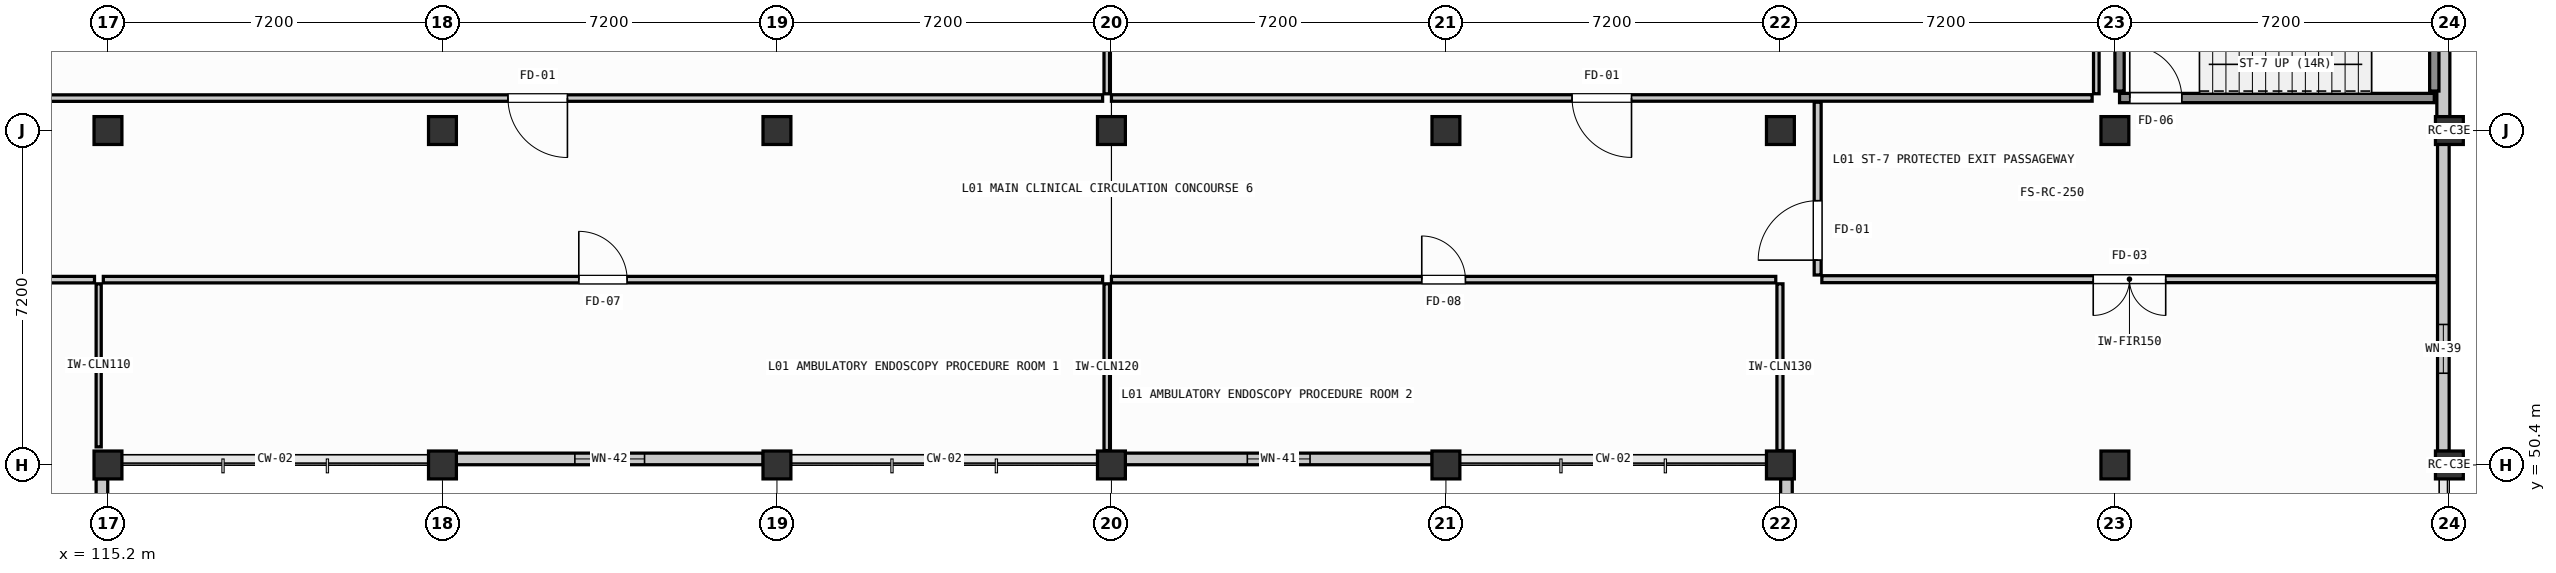
"""IFC4 building model, lengths in metres.
Left out: names, types, materials, properties, quantities, classifications, styles, units other than length and angle.
Written with IfcOpenShell. Run it as: python <this file> out.ifc"""

import sys

from ifc_helpers import new_model, si_unit, direction, frame, frame_2d, origin, origin_2d, place, context, subcontext, project, spatial, rectangle, extrude, element, fill, save


model = new_model("IFC4")
c1 = context("Model", 3, precision=1e-05, world=origin(), true_north=direction((0.0, 1.0)))
c2 = subcontext(c1, "Body", "Model", "MODEL_VIEW")
j1 = project(units=[si_unit("LENGTHUNIT", "METRE"), si_unit("PLANEANGLEUNIT", "RADIAN")], contexts=[c1])
p1 = place(None, origin())
s1 = spatial("IfcSite", under=j1, at=p1, CompositionType="ELEMENT")
p2 = place(p1, origin())
s2 = spatial("IfcBuilding", under=s1, at=p2, CompositionType="ELEMENT")
p3 = place(p2, origin())
s3 = spatial("IfcBuildingStorey", under=s2, at=p3, CompositionType="ELEMENT", Elevation=0.0)
for number, where, z_axis, x_axis in (
    (1, (115.2, 50.4, -0.25), (0.0, 0.0, 1.0), (1.0, 0.0, 0.0)),
    (2, (115.2, 57.6, -0.25), (0.0, 0.0, 1.0), (1.0, 0.0, 0.0)),
    (3, (122.4, 50.4, -0.25), (0.0, 0.0, 1.0), (1.0, 0.0, 0.0)),
    (4, (122.4, 57.6, -0.25), (0.0, 0.0, 1.0), (1.0, 0.0, 0.0)),
    (5, (129.6, 50.4, -0.25), (0.0, 0.0, 1.0), (1.0, 0.0, 0.0)),
    (6, (129.6, 57.6, -0.25), (0.0, 0.0, 1.0), (1.0, 0.0, 0.0)),
    (7, (136.8, 50.4, -0.25), (0.0, 0.0, 1.0), (1.0, 0.0, 0.0)),
    (8, (136.8, 57.6, -0.25), (0.0, 0.0, 1.0), (1.0, 0.0, 0.0)),
    (9, (144.0, 50.4, -0.25), (0.0, 0.0, 1.0), (1.0, 0.0, 0.0)),
    (10, (144.0, 57.6, -0.25), (0.0, 0.0, 1.0), (1.0, 0.0, 0.0)),
    (11, (151.2, 50.4, -0.25), (0.0, 0.0, 1.0), (1.0, 0.0, 0.0)),
    (12, (151.2, 57.6, -0.25), (0.0, 0.0, 1.0), (1.0, 0.0, 0.0)),
    (13, (158.4, 50.4, -0.25), (0.0, 0.0, 1.0), (1.0, 0.0, 0.0)),
    (14, (158.4, 57.6, -0.25), (0.0, 0.0, 1.0), (1.0, 0.0, 0.0)),
    (15, (165.6, 50.4, -0.25), (0.0, 0.0, 1.0), (1.0, 0.0, 0.0)),
    (16, (165.6, 57.6, -0.25), (0.0, 0.0, 1.0), (1.0, 0.0, 0.0)),
):
    element("IfcColumn", number, at=place(p3, frame(where, z_axis=z_axis, x_axis=x_axis)), inside=s3, PredefinedType="COLUMN", context=c2, shape_type="SweptSolid", body=[
        extrude(rectangle(XDim=0.6, YDim=0.6, at=origin_2d()), origin(), (0.0, 0.0, 1.0), 4.81),
    ])
p4 = place(p3, frame((165.47, 64.505, 0.0), z_axis=(0.0, 0.0, 1.0), x_axis=(0.0, -1.0, 0.0)))
e17 = element("IfcWall", 17, at=p4, inside=s3, PredefinedType="SOLIDWALL", context=c2, shape_type="SweptSolid", body=[
    extrude(rectangle(XDim=6.61, YDim=0.28, at=frame_2d((3.305, 0.0))), origin(), (0.0, 0.0, 1.0), 3.76),
])
p5 = place(p3, frame((165.47, 57.305, 0.0), z_axis=(0.0, 0.0, 1.0), x_axis=(0.0, -1.0, 0.0)))
e18 = element("IfcWall", 18, at=p5, inside=s3, PredefinedType="SOLIDWALL", context=c2, shape_type="SweptSolid", body=[
    extrude(rectangle(XDim=6.61, YDim=0.25, at=frame_2d((3.305, 0.0))), origin(), (0.0, 0.0, 1.0), 3.76),
])
p6 = place(p5, frame((3.88, 0.0, 0.95)))
e19 = element("IfcOpeningElement", 19, at=p6, cuts=e18, PredefinedType="OPENING", context=c2, shape_type="SweptSolid", body=[
    extrude(rectangle(XDim=1.05, YDim=1.55, at=frame_2d((0.525, 0.775))), frame((0.0, 0.135, 0.0), z_axis=(0.0, -1.0, 0.0), x_axis=(1.0, 0.0, 0.0)), (0.0, 0.0, 1.0), 0.27),
])
p7 = place(p3, frame((151.33, 43.495, 0.0), z_axis=(0.0, 0.0, 1.0), x_axis=(0.0, 1.0, 0.0)))
e20 = element("IfcWall", 20, at=p7, inside=s3, PredefinedType="SOLIDWALL", context=c2, shape_type="SweptSolid", body=[
    extrude(rectangle(XDim=6.61, YDim=0.25, at=frame_2d((3.305, 0.0))), origin(), (0.0, 0.0, 1.0), 3.76),
])
p8 = place(p7, frame((2.105, 0.0, 0.0)))
e21 = element("IfcOpeningElement", 21, at=p8, cuts=e20, PredefinedType="OPENING", context=c2, shape_type="SweptSolid", body=[
    extrude(rectangle(XDim=2.4, YDim=2.5, at=frame_2d((1.2, 1.25))), frame((0.0, 0.135, 0.0), z_axis=(0.0, -1.0, 0.0), x_axis=(1.0, 0.0, 0.0)), (0.0, 0.0, 1.0), 0.27),
])
p9 = place(p3, frame((143.705, 50.53, 0.0), z_axis=(0.0, 0.0, 1.0), x_axis=(-1.0, 0.0, 0.0)))
e22 = element("IfcWall", 22, at=p9, inside=s3, PredefinedType="SOLIDWALL", context=c2, shape_type="SweptSolid", body=[
    extrude(rectangle(XDim=6.61, YDim=0.25, at=frame_2d((3.305, 0.0))), origin(), (0.0, 0.0, 1.0), 3.76),
])
p10 = place(p9, frame((2.63, 0.0, 0.95)))
e23 = element("IfcOpeningElement", 23, at=p10, cuts=e22, PredefinedType="OPENING", context=c2, shape_type="SweptSolid", body=[
    extrude(rectangle(XDim=1.35, YDim=1.55, at=frame_2d((0.675, 0.775))), frame((0.0, 0.135, 0.0), z_axis=(0.0, -1.0, 0.0), x_axis=(1.0, 0.0, 0.0)), (0.0, 0.0, 1.0), 0.27),
])
p11 = place(p3, frame((129.305, 50.53, 0.0), z_axis=(0.0, 0.0, 1.0), x_axis=(-1.0, 0.0, 0.0)))
e24 = element("IfcWall", 24, at=p11, inside=s3, PredefinedType="SOLIDWALL", context=c2, shape_type="SweptSolid", body=[
    extrude(rectangle(XDim=6.61, YDim=0.25, at=frame_2d((3.305, 0.0))), origin(), (0.0, 0.0, 1.0), 3.76),
])
p12 = place(p11, frame((2.555, 0.0, 0.95)))
e25 = element("IfcOpeningElement", 25, at=p12, cuts=e24, PredefinedType="OPENING", context=c2, shape_type="SweptSolid", body=[
    extrude(rectangle(XDim=1.5, YDim=1.55, at=frame_2d((0.75, 0.775))), frame((0.0, 0.135, 0.0), z_axis=(0.0, -1.0, 0.0), x_axis=(1.0, 0.0, 0.0)), (0.0, 0.0, 1.0), 0.27),
])
p13 = place(p3, frame((115.07, 50.105, 0.0), z_axis=(0.0, 0.0, 1.0), x_axis=(0.0, -1.0, 0.0)))
e26 = element("IfcWall", 26, at=p13, inside=s3, PredefinedType="SOLIDWALL", context=c2, shape_type="SweptSolid", body=[
    extrude(rectangle(XDim=6.61, YDim=0.25, at=frame_2d((3.305, 0.0))), origin(), (0.0, 0.0, 1.0), 3.76),
])
p14 = place(p13, frame((2.48, 0.0, 0.95)))
e27 = element("IfcOpeningElement", 27, at=p14, cuts=e26, PredefinedType="OPENING", context=c2, shape_type="SweptSolid", body=[
    extrude(rectangle(XDim=1.65, YDim=1.55, at=frame_2d((0.825, 0.775))), frame((0.0, 0.135, 0.0), z_axis=(0.0, -1.0, 0.0), x_axis=(1.0, 0.0, 0.0)), (0.0, 0.0, 1.0), 0.27),
])
p15 = place(p3, frame((158.5, 58.3, -0.25), z_axis=(0.0, 0.0, 1.0), x_axis=(1.0, 0.0, 0.0)))
e28 = element("IfcWall", 28, at=p15, inside=s3, PredefinedType="SHEAR", context=c2, shape_type="SweptSolid", body=[
    extrude(rectangle(XDim=6.775, YDim=0.2, at=frame_2d((3.387, 0.0))), origin(), (0.0, 0.0, 1.0), 5.05),
])
p16 = place(p15, frame((0.22, 0.0, 0.25)))
e29 = element("IfcOpeningElement", 29, at=p16, cuts=e28, PredefinedType="OPENING", context=c2, shape_type="SweptSolid", body=[
    extrude(rectangle(XDim=1.12, YDim=2.14, at=frame_2d((0.56, 1.07))), frame((0.0, 0.11, 0.0), z_axis=(0.0, -1.0, 0.0), x_axis=(1.0, 0.0, 0.0)), (0.0, 0.0, 1.0), 0.22),
])
for number, where, z_axis, x_axis in (
    (30, (158.5, 58.45, -0.25), (0.0, 0.0, 1.0), (0.0, 1.0, 0.0)),
    (31, (165.275, 58.45, -0.25), (0.0, 0.0, 1.0), (0.0, 1.0, 0.0)),
):
    element("IfcWall", number, at=place(p3, frame(where, z_axis=z_axis, x_axis=x_axis)), inside=s3, PredefinedType="SHEAR", context=c2, shape_type="SweptSolid", body=[
        extrude(rectangle(XDim=2.6, YDim=0.2, at=frame_2d((1.3, 0.0))), origin(), (0.0, 0.0, 1.0), 5.05),
    ])
p17 = place(p3, frame((165.335, 54.4, 0.0), z_axis=(0.0, 0.0, 1.0), x_axis=(-1.0, 0.0, 0.0)))
e32 = element("IfcWall", 32, at=p17, inside=s3, PredefinedType="PARTITIONING", context=c2, shape_type="SweptSolid", body=[
    extrude(rectangle(XDim=13.243, YDim=0.15, at=frame_2d((6.622, 0.0))), origin(), (0.0, 0.0, 1.0), 3.86),
])
p18 = place(p17, frame((5.842, 0.0, 0.0)))
e33 = element("IfcOpeningElement", 33, at=p18, cuts=e32, PredefinedType="OPENING", context=c2, shape_type="SweptSolid", body=[
    extrude(rectangle(XDim=1.56, YDim=2.22, at=frame_2d((0.78, 1.11))), frame((0.0, 0.085, 0.0), z_axis=(0.0, -1.0, 0.0), x_axis=(1.0, 0.0, 0.0)), (0.0, 0.0, 1.0), 0.17),
])
p19 = place(p3, frame((152.002, 54.49, 0.0), z_axis=(0.0, 0.0, 1.0), x_axis=(0.0, 1.0, 0.0)))
e34 = element("IfcWall", 34, at=p19, inside=s3, PredefinedType="PARTITIONING", context=c2, shape_type="SweptSolid", body=[
    extrude(rectangle(XDim=3.72, YDim=0.15, at=frame_2d((1.86, 0.0))), origin(), (0.0, 0.0, 1.0), 3.76),
])
p20 = place(p19, frame((0.32, 0.0, 0.0)))
e35 = element("IfcOpeningElement", 35, at=p20, cuts=e34, PredefinedType="OPENING", context=c2, shape_type="SweptSolid", body=[
    extrude(rectangle(XDim=1.28, YDim=2.18, at=frame_2d((0.64, 1.09))), frame((0.0, 0.085, 0.0), z_axis=(0.0, -1.0, 0.0), x_axis=(1.0, 0.0, 0.0)), (0.0, 0.0, 1.0), 0.17),
])
p21 = place(p3, frame((101.29, 54.39, 0.0), z_axis=(0.0, 0.0, 1.0), x_axis=(1.0, 0.0, 0.0)))
e36 = element("IfcWall", 36, at=p21, inside=s3, PredefinedType="PARTITIONING", context=c2, shape_type="SweptSolid", body=[
    extrude(rectangle(XDim=13.62, YDim=0.14, at=frame_2d((6.81, 0.0))), origin(), (0.0, 0.0, 1.0), 3.86),
])
p22 = place(p21, frame((6.25, 0.0, 0.0)))
e37 = element("IfcOpeningElement", 37, at=p22, cuts=e36, PredefinedType="OPENING", context=c2, shape_type="SweptSolid", body=[
    extrude(rectangle(XDim=1.12, YDim=2.14, at=frame_2d((0.56, 1.07))), frame((0.0, 0.08, 0.0), z_axis=(0.0, -1.0, 0.0), x_axis=(1.0, 0.0, 0.0)), (0.0, 0.0, 1.0), 0.16),
])
p23 = place(p3, frame((115.0, 54.3, 0.0), z_axis=(0.0, 0.0, 1.0), x_axis=(0.0, -1.0, 0.0)))
e38 = element("IfcWall", 38, at=p23, inside=s3, PredefinedType="PARTITIONING", context=c2, shape_type="SweptSolid", body=[
    extrude(rectangle(XDim=3.511, YDim=0.11, at=frame_2d((1.755, 0.0))), origin(), (0.0, 0.0, 1.0), 3.76),
])
p24 = place(p3, frame((115.1, 54.39, 0.0), z_axis=(0.0, 0.0, 1.0), x_axis=(1.0, 0.0, 0.0)))
e39 = element("IfcWall", 39, at=p24, inside=s3, PredefinedType="PARTITIONING", context=c2, shape_type="SweptSolid", body=[
    extrude(rectangle(XDim=21.51, YDim=0.14, at=frame_2d((10.755, 0.0))), origin(), (0.0, 0.0, 1.0), 3.86),
])
p25 = place(p24, frame((10.235, 0.0, 0.0)))
e40 = element("IfcOpeningElement", 40, at=p25, cuts=e39, PredefinedType="OPENING", context=c2, shape_type="SweptSolid", body=[
    extrude(rectangle(XDim=1.04, YDim=2.12, at=frame_2d((0.52, 1.06))), frame((0.0, 0.08, 0.0), z_axis=(0.0, -1.0, 0.0), x_axis=(1.0, 0.0, 0.0)), (0.0, 0.0, 1.0), 0.16),
])
p26 = place(p3, frame((136.7, 54.3, 0.0), z_axis=(0.0, 0.0, 1.0), x_axis=(0.0, -1.0, 0.0)))
e41 = element("IfcWall", 41, at=p26, inside=s3, PredefinedType="PARTITIONING", context=c2, shape_type="SweptSolid", body=[
    extrude(rectangle(XDim=3.59, YDim=0.12, at=frame_2d((1.795, 0.0))), origin(), (0.0, 0.0, 1.0), 3.76),
])
p27 = place(p3, frame((136.8, 54.39, 0.0), z_axis=(0.0, 0.0, 1.0), x_axis=(1.0, 0.0, 0.0)))
e42 = element("IfcWall", 42, at=p27, inside=s3, PredefinedType="PARTITIONING", context=c2, shape_type="SweptSolid", body=[
    extrude(rectangle(XDim=14.3, YDim=0.14, at=frame_2d((7.15, 0.0))), origin(), (0.0, 0.0, 1.0), 3.86),
])
p28 = place(p27, frame((6.68, 0.0, 0.0)))
e43 = element("IfcOpeningElement", 43, at=p28, cuts=e42, PredefinedType="OPENING", context=c2, shape_type="SweptSolid", body=[
    extrude(rectangle(XDim=0.94, YDim=2.1, at=frame_2d((0.47, 1.05))), frame((0.0, 0.08, 0.0), z_axis=(0.0, -1.0, 0.0), x_axis=(1.0, 0.0, 0.0)), (0.0, 0.0, 1.0), 0.16),
])
p29 = place(p3, frame((151.19, 54.3, 0.0), z_axis=(0.0, 0.0, 1.0), x_axis=(0.0, -1.0, 0.0)))
e44 = element("IfcWall", 44, at=p29, inside=s3, PredefinedType="PARTITIONING", context=c2, shape_type="SweptSolid", body=[
    extrude(rectangle(XDim=3.59, YDim=0.13, at=frame_2d((1.795, 0.0))), origin(), (0.0, 0.0, 1.0), 3.76),
])
p30 = place(p3, frame((136.7, 64.49, 0.0), z_axis=(0.0, 0.0, 1.0), x_axis=(0.0, -1.0, 0.0)))
e45 = element("IfcWall", 45, at=p30, inside=s3, PredefinedType="PARTITIONING", context=c2, shape_type="SweptSolid", body=[
    extrude(rectangle(XDim=6.1, YDim=0.12, at=frame_2d((3.05, 0.0))), origin(), (0.0, 0.0, 1.0), 3.76),
])
p31 = place(p30, frame((2.35, 0.0, 1.15)))
e46 = element("IfcOpeningElement", 46, at=p31, cuts=e45, PredefinedType="OPENING", context=c2, shape_type="SweptSolid", body=[
    extrude(rectangle(XDim=1.4, YDim=1.05, at=frame_2d((0.7, 0.525))), frame((0.0, 0.07, 0.0), z_axis=(0.0, -1.0, 0.0), x_axis=(1.0, 0.0, 0.0)), (0.0, 0.0, 1.0), 0.14),
])
p32 = place(p3, frame((136.61, 58.301, 0.0), z_axis=(0.0, 0.0, 1.0), x_axis=(-0.999999994495, -0.000104930876, 0.0)))
e47 = element("IfcWall", 47, at=p32, inside=s3, PredefinedType="PARTITIONING", context=c2, shape_type="SweptSolid", body=[
    extrude(rectangle(XDim=27.92, YDim=0.14, at=frame_2d((13.96, 0.0))), origin(), (0.0, 0.0, 1.0), 3.86),
])
p33 = place(p32, frame((11.52, 0.0, 0.0)))
e48 = element("IfcOpeningElement", 48, at=p33, cuts=e47, PredefinedType="OPENING", context=c2, shape_type="SweptSolid", body=[
    extrude(rectangle(XDim=1.28, YDim=2.18, at=frame_2d((0.64, 1.09))), frame((0.0, 0.08, 0.0), z_axis=(0.0, -1.0, 0.0), x_axis=(1.0, 0.0, 0.0)), (0.0, 0.0, 1.0), 0.16),
])
p34 = place(p3, frame((158.0, 64.51, 0.0), z_axis=(0.0, 0.0, 1.0), x_axis=(0.0, -1.0, 0.0)))
e49 = element("IfcWall", 49, at=p34, inside=s3, PredefinedType="PARTITIONING", context=c2, shape_type="SweptSolid", body=[
    extrude(rectangle(XDim=6.118, YDim=0.12, at=frame_2d((3.059, 0.0))), origin(), (0.0, 0.0, 1.0), 3.76),
])
p35 = place(p3, frame((157.91, 58.302, 0.0), z_axis=(0.0, 0.0, 1.0), x_axis=(-0.999999997592, -6.9391437e-05, 0.0)))
e50 = element("IfcWall", 50, at=p35, inside=s3, PredefinedType="PARTITIONING", context=c2, shape_type="SweptSolid", body=[
    extrude(rectangle(XDim=21.11, YDim=0.14, at=frame_2d((10.555, 0.0))), origin(), (0.0, 0.0, 1.0), 3.86),
])
p36 = place(p35, frame((9.915, 0.0, 0.0)))
e51 = element("IfcOpeningElement", 51, at=p36, cuts=e50, PredefinedType="OPENING", context=c2, shape_type="SweptSolid", body=[
    extrude(rectangle(XDim=1.28, YDim=2.18, at=frame_2d((0.64, 1.09))), frame((0.0, 0.08, 0.0), z_axis=(0.0, -1.0, 0.0), x_axis=(1.0, 0.0, 0.0)), (0.0, 0.0, 1.0), 0.16),
])
p37 = place(p6, origin())
e52 = element("IfcWindow", 52, at=p37, inside=s3, PartitioningType="SINGLE_PANEL", PredefinedType="WINDOW", context=c2, shape_type="SweptSolid", body=[
    extrude(rectangle(XDim=1.05, YDim=1.55, at=frame_2d((0.525, 0.775))), frame((0.0, 0.03, 0.0), z_axis=(0.0, -1.0, 0.0), x_axis=(1.0, 0.0, 0.0)), (0.0, 0.0, 1.0), 0.06),
])
fill(e19, e52)
p38 = place(p10, origin())
e53 = element("IfcWindow", 53, at=p38, inside=s3, PartitioningType="SINGLE_PANEL", PredefinedType="WINDOW", context=c2, shape_type="SweptSolid", body=[
    extrude(rectangle(XDim=1.35, YDim=1.55, at=frame_2d((0.675, 0.775))), frame((0.0, 0.03, 0.0), z_axis=(0.0, -1.0, 0.0), x_axis=(1.0, 0.0, 0.0)), (0.0, 0.0, 1.0), 0.06),
])
fill(e23, e53)
p39 = place(p12, origin())
e54 = element("IfcWindow", 54, at=p39, inside=s3, PartitioningType="SINGLE_PANEL", PredefinedType="WINDOW", context=c2, shape_type="SweptSolid", body=[
    extrude(rectangle(XDim=1.5, YDim=1.55, at=frame_2d((0.75, 0.775))), frame((0.0, 0.03, 0.0), z_axis=(0.0, -1.0, 0.0), x_axis=(1.0, 0.0, 0.0)), (0.0, 0.0, 1.0), 0.06),
])
fill(e25, e54)
p40 = place(p16, origin())
e55 = element("IfcDoor", 55, at=p40, inside=s3, OperationType="SINGLE_SWING_LEFT", PredefinedType="DOOR", context=c2, shape_type="SweptSolid", body=[
    extrude(rectangle(XDim=1.12, YDim=2.14, at=frame_2d((0.56, 1.07))), frame((0.0, 0.025, 0.0), z_axis=(0.0, -1.0, 0.0), x_axis=(1.0, 0.0, 0.0)), (0.0, 0.0, 1.0), 0.05),
])
fill(e29, e55)
p41 = place(p20, origin())
e56 = element("IfcDoor", 56, at=p41, inside=s3, OperationType="SINGLE_SWING_LEFT", PredefinedType="DOOR", context=c2, shape_type="SweptSolid", body=[
    extrude(rectangle(XDim=1.28, YDim=2.18, at=frame_2d((0.64, 1.09))), frame((0.0, 0.025, 0.0), z_axis=(0.0, -1.0, 0.0), x_axis=(1.0, 0.0, 0.0)), (0.0, 0.0, 1.0), 0.05),
])
fill(e35, e56)
p42 = place(p25, origin())
e57 = element("IfcDoor", 57, at=p42, inside=s3, OperationType="SINGLE_SWING_RIGHT", PredefinedType="DOOR", context=c2, shape_type="SweptSolid", body=[
    extrude(rectangle(XDim=1.04, YDim=2.12, at=frame_2d((0.52, 1.06))), frame((0.0, 0.025, 0.0), z_axis=(0.0, -1.0, 0.0), x_axis=(1.0, 0.0, 0.0)), (0.0, 0.0, 1.0), 0.05),
])
fill(e40, e57)
p43 = place(p28, origin())
e58 = element("IfcDoor", 58, at=p43, inside=s3, OperationType="SINGLE_SWING_LEFT", PredefinedType="DOOR", context=c2, shape_type="SweptSolid", body=[
    extrude(rectangle(XDim=0.94, YDim=2.1, at=frame_2d((0.47, 1.05))), frame((0.0, 0.025, 0.0), z_axis=(0.0, -1.0, 0.0), x_axis=(1.0, 0.0, 0.0)), (0.0, 0.0, 1.0), 0.05),
])
fill(e43, e58)
p44 = place(p18, origin())
e59 = element("IfcDoor", 59, at=p44, inside=s3, OperationType="DOUBLE_DOOR_SINGLE_SWING", PredefinedType="DOOR", context=c2, shape_type="SweptSolid", body=[
    extrude(rectangle(XDim=1.56, YDim=2.22, at=frame_2d((0.78, 1.11))), frame((0.0, 0.025, 0.0), z_axis=(0.0, -1.0, 0.0), x_axis=(1.0, 0.0, 0.0)), (0.0, 0.0, 1.0), 0.05),
])
fill(e33, e59)
p45 = place(p33, origin())
e60 = element("IfcDoor", 60, at=p45, inside=s3, OperationType="SINGLE_SWING_LEFT", PredefinedType="DOOR", context=c2, shape_type="SweptSolid", body=[
    extrude(rectangle(XDim=1.28, YDim=2.18, at=frame_2d((0.64, 1.09))), frame((0.0, 0.025, 0.0), z_axis=(0.0, -1.0, 0.0), x_axis=(1.0, 0.0, 0.0)), (0.0, 0.0, 1.0), 0.05),
])
fill(e48, e60)
p46 = place(p36, origin())
e61 = element("IfcDoor", 61, at=p46, inside=s3, OperationType="SINGLE_SWING_RIGHT", PredefinedType="DOOR", context=c2, shape_type="SweptSolid", body=[
    extrude(rectangle(XDim=1.28, YDim=2.18, at=frame_2d((0.64, 1.09))), frame((0.0, 0.025, 0.0), z_axis=(0.0, -1.0, 0.0), x_axis=(1.0, 0.0, 0.0)), (0.0, 0.0, 1.0), 0.05),
])
fill(e51, e61)
save(model, sys.argv[1])
